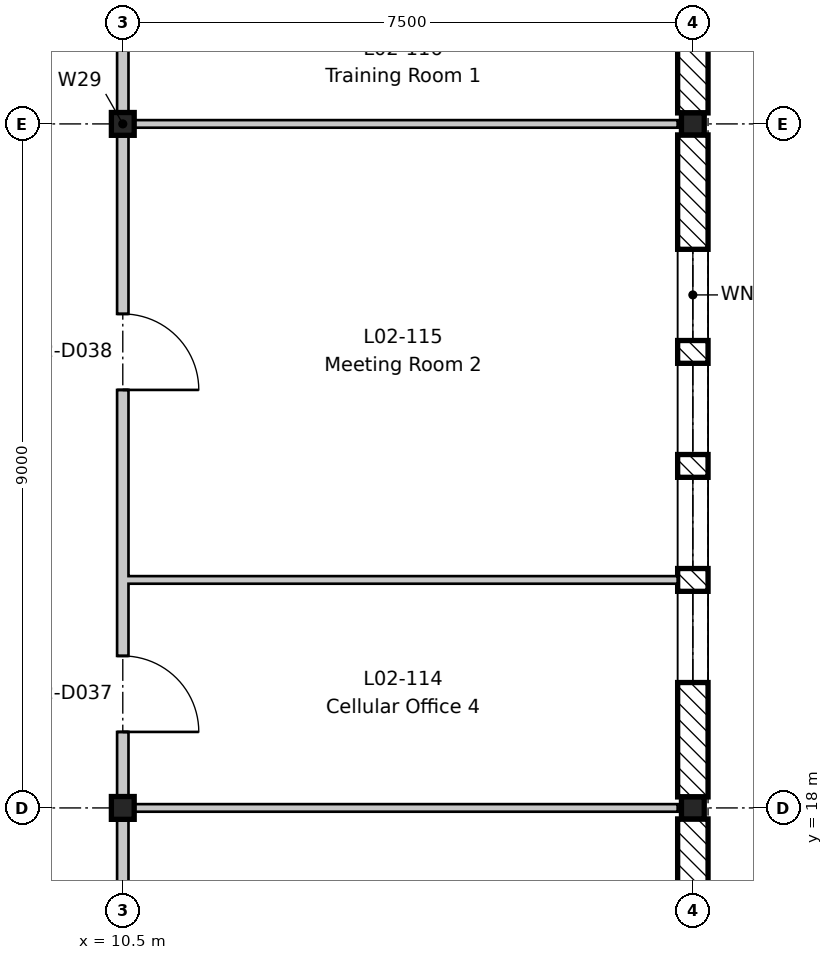
"""IFC4 building model, lengths in metres.
Left out: names, types, materials, properties, quantities, classifications, styles, units other than length and angle.
Written with IfcOpenShell. Run it as: python <this file> out.ifc"""

import sys

from ifc_helpers import new_model, si_unit, direction, frame, frame_2d, origin, origin_2d, place, context, subcontext, project, spatial, rectangle, i_section, extrude, element, fill, save


model = new_model("IFC4")
c1 = context("Model", 3, precision=1e-05, world=origin(), true_north=direction((0.0, 1.0)))
c2 = subcontext(c1, "Body", "Model", "MODEL_VIEW")
j1 = project(units=[si_unit("LENGTHUNIT", "METRE"), si_unit("PLANEANGLEUNIT", "RADIAN")], contexts=[c1])
p1 = place(None, origin())
s1 = spatial("IfcSite", under=j1, at=p1, CompositionType="ELEMENT")
p2 = place(p1, origin())
s2 = spatial("IfcBuilding", under=s1, at=p2, CompositionType="ELEMENT")
p3 = place(p2, frame((0.0, 0.0, 9.9)))
s3 = spatial("IfcBuildingStorey", under=s2, at=p3, CompositionType="ELEMENT", Elevation=9.9)
for number, where, z_axis, x_axis in (
    (1, (10.5, 18.0, -0.2), (0.0, 0.0, 1.0), (1.0, 0.0, 0.0)),
    (2, (10.5, 27.0, -0.2), (0.0, 0.0, 1.0), (1.0, 0.0, 0.0)),
):
    element("IfcColumn", number, at=place(p3, frame(where, z_axis=z_axis, x_axis=x_axis)), inside=s3, PredefinedType="COLUMN", context=c2, shape_type="SweptSolid", body=[
        extrude(i_section(OverallWidth=0.3, OverallDepth=0.3, WebThickness=0.011, FlangeThickness=0.019, FilletRadius=0.027, at=origin_2d()), origin(), (0.0, 0.0, 1.0), 4.5),
    ])
for number, where, z_axis, x_axis in (
    (3, (18.0, 18.0, -0.2), (0.0, 0.0, 1.0), (1.0, 0.0, 0.0)),
    (4, (18.0, 27.0, -0.2), (0.0, 0.0, 1.0), (1.0, 0.0, 0.0)),
):
    element("IfcColumn", number, at=place(p3, frame(where, z_axis=z_axis, x_axis=x_axis)), inside=s3, PredefinedType="COLUMN", context=c2, shape_type="SweptSolid", body=[
        extrude(i_section(OverallWidth=0.3, OverallDepth=0.29, WebThickness=0.009, FlangeThickness=0.014, FilletRadius=0.027, at=origin_2d()), origin(), (0.0, 0.0, 1.0), 4.5),
    ])
p4 = place(p3, frame((18.0, 17.855, 0.0), z_axis=(0.0, 0.0, 1.0), x_axis=(0.0, -1.0, 0.0)))
e5 = element("IfcWall", 5, at=p4, inside=s3, PredefinedType="STANDARD", context=c2, shape_type="SweptSolid", body=[
    extrude(rectangle(XDim=8.71, YDim=0.4, at=frame_2d((4.355, 0.0))), origin(), (0.0, 0.0, 1.0), 3.9),
])
p5 = place(p3, frame((18.0, 26.855, 0.0), z_axis=(0.0, 0.0, 1.0), x_axis=(0.0, -1.0, 0.0)))
e6 = element("IfcWall", 6, at=p5, inside=s3, PredefinedType="STANDARD", context=c2, shape_type="SweptSolid", body=[
    extrude(rectangle(XDim=8.71, YDim=0.4, at=frame_2d((4.355, 0.0))), origin(), (0.0, 0.0, 1.0), 3.9),
])
p6 = place(p5, frame((6.005, 0.0, 0.6)))
e7 = element("IfcOpeningElement", 7, at=p6, cuts=e6, PredefinedType="OPENING", context=c2, shape_type="SweptSolid", body=[
    extrude(rectangle(XDim=1.2, YDim=3.0, at=frame_2d((0.6, 1.5))), frame((0.0, 0.21, 0.0), z_axis=(0.0, -1.0, 0.0), x_axis=(1.0, 0.0, 0.0)), (0.0, 0.0, 1.0), 0.42),
])
p7 = place(p5, frame((4.505, 0.0, 0.6)))
e8 = element("IfcOpeningElement", 8, at=p7, cuts=e6, PredefinedType="OPENING", context=c2, shape_type="SweptSolid", body=[
    extrude(rectangle(XDim=1.2, YDim=3.0, at=frame_2d((0.6, 1.5))), frame((0.0, 0.21, 0.0), z_axis=(0.0, -1.0, 0.0), x_axis=(1.0, 0.0, 0.0)), (0.0, 0.0, 1.0), 0.42),
])
p8 = place(p5, frame((3.005, 0.0, 0.6)))
e9 = element("IfcOpeningElement", 9, at=p8, cuts=e6, PredefinedType="OPENING", context=c2, shape_type="SweptSolid", body=[
    extrude(rectangle(XDim=1.2, YDim=3.0, at=frame_2d((0.6, 1.5))), frame((0.0, 0.21, 0.0), z_axis=(0.0, -1.0, 0.0), x_axis=(1.0, 0.0, 0.0)), (0.0, 0.0, 1.0), 0.42),
])
p9 = place(p5, frame((1.505, 0.0, 0.6)))
e10 = element("IfcOpeningElement", 10, at=p9, cuts=e6, PredefinedType="OPENING", context=c2, shape_type="SweptSolid", body=[
    extrude(rectangle(XDim=1.2, YDim=3.0, at=frame_2d((0.6, 1.5))), frame((0.0, 0.21, 0.0), z_axis=(0.0, -1.0, 0.0), x_axis=(1.0, 0.0, 0.0)), (0.0, 0.0, 1.0), 0.42),
])
p10 = place(p3, frame((18.0, 35.855, 0.0), z_axis=(0.0, 0.0, 1.0), x_axis=(0.0, -1.0, 0.0)))
e11 = element("IfcWall", 11, at=p10, inside=s3, PredefinedType="STANDARD", context=c2, shape_type="SweptSolid", body=[
    extrude(rectangle(XDim=8.71, YDim=0.4, at=frame_2d((4.355, 0.0))), origin(), (0.0, 0.0, 1.0), 3.9),
])
p11 = place(p10, frame((6.005, 0.0, 0.6)))
e12 = element("IfcOpeningElement", 12, at=p11, cuts=e11, PredefinedType="OPENING", context=c2, shape_type="SweptSolid", body=[
    extrude(rectangle(XDim=1.2, YDim=3.0, at=frame_2d((0.6, 1.5))), frame((0.0, 0.21, 0.0), z_axis=(0.0, -1.0, 0.0), x_axis=(1.0, 0.0, 0.0)), (0.0, 0.0, 1.0), 0.42),
])
p12 = place(p10, frame((4.505, 0.0, 0.6)))
e13 = element("IfcOpeningElement", 13, at=p12, cuts=e11, PredefinedType="OPENING", context=c2, shape_type="SweptSolid", body=[
    extrude(rectangle(XDim=1.2, YDim=3.0, at=frame_2d((0.6, 1.5))), frame((0.0, 0.21, 0.0), z_axis=(0.0, -1.0, 0.0), x_axis=(1.0, 0.0, 0.0)), (0.0, 0.0, 1.0), 0.42),
])
p13 = place(p10, frame((3.005, 0.0, 0.6)))
e14 = element("IfcOpeningElement", 14, at=p13, cuts=e11, PredefinedType="OPENING", context=c2, shape_type="SweptSolid", body=[
    extrude(rectangle(XDim=1.2, YDim=3.0, at=frame_2d((0.6, 1.5))), frame((0.0, 0.21, 0.0), z_axis=(0.0, -1.0, 0.0), x_axis=(1.0, 0.0, 0.0)), (0.0, 0.0, 1.0), 0.42),
])
p14 = place(p10, frame((1.505, 0.0, 0.6)))
e15 = element("IfcOpeningElement", 15, at=p14, cuts=e11, PredefinedType="OPENING", context=c2, shape_type="SweptSolid", body=[
    extrude(rectangle(XDim=1.2, YDim=3.0, at=frame_2d((0.6, 1.5))), frame((0.0, 0.21, 0.0), z_axis=(0.0, -1.0, 0.0), x_axis=(1.0, 0.0, 0.0)), (0.0, 0.0, 1.0), 0.42),
])
p15 = place(p3, frame((10.575, 18.0, 0.0), z_axis=(0.0, 0.0, 1.0), x_axis=(1.0, 0.0, 0.0)))
e16 = element("IfcWall", 16, at=p15, inside=s3, PredefinedType="PARTITIONING", context=c2, shape_type="SweptSolid", body=[
    extrude(rectangle(XDim=7.225, YDim=0.1, at=frame_2d((3.613, 0.0))), origin(), (0.0, 0.0, 1.0), 3.95),
])
p16 = place(p3, frame((10.575, 21.0, 0.0), z_axis=(0.0, 0.0, 1.0), x_axis=(1.0, 0.0, 0.0)))
e17 = element("IfcWall", 17, at=p16, inside=s3, PredefinedType="PARTITIONING", context=c2, shape_type="SweptSolid", body=[
    extrude(rectangle(XDim=7.225, YDim=0.1, at=frame_2d((3.613, 0.0))), origin(), (0.0, 0.0, 1.0), 4.3),
])
p17 = place(p3, frame((10.575, 27.0, 0.0), z_axis=(0.0, 0.0, 1.0), x_axis=(1.0, 0.0, 0.0)))
e18 = element("IfcWall", 18, at=p17, inside=s3, PredefinedType="PARTITIONING", context=c2, shape_type="SweptSolid", body=[
    extrude(rectangle(XDim=7.225, YDim=0.1, at=frame_2d((3.613, 0.0))), origin(), (0.0, 0.0, 1.0), 3.95),
])
p18 = place(p3, frame((10.5, -8.8, 0.0), z_axis=(0.0, 0.0, 1.0), x_axis=(0.0, 1.0, 0.0)))
e19 = element("IfcWall", 19, at=p18, inside=s3, PredefinedType="PARTITIONING", context=c2, shape_type="SweptSolid", body=[
    extrude(rectangle(XDim=79.3, YDim=0.15, at=frame_2d((39.65, 0.0))), origin(), (0.0, 0.0, 1.0), 3.78),
])
p19 = place(p18, frame((0.8, 0.0, 0.0)))
e20 = element("IfcOpeningElement", 20, at=p19, cuts=e19, PredefinedType="OPENING", context=c2, shape_type="SweptSolid", body=[
    extrude(rectangle(XDim=1.0, YDim=2.1, at=frame_2d((0.5, 1.05))), frame((0.0, 0.085, 0.0), z_axis=(0.0, -1.0, 0.0), x_axis=(1.0, 0.0, 0.0)), (0.0, 0.0, 1.0), 0.17),
])
p20 = place(p18, frame((5.3, 0.0, 0.0)))
e21 = element("IfcOpeningElement", 21, at=p20, cuts=e19, PredefinedType="OPENING", context=c2, shape_type="SweptSolid", body=[
    extrude(rectangle(XDim=1.0, YDim=2.1, at=frame_2d((0.5, 1.05))), frame((0.0, 0.085, 0.0), z_axis=(0.0, -1.0, 0.0), x_axis=(1.0, 0.0, 0.0)), (0.0, 0.0, 1.0), 0.17),
])
p21 = place(p18, frame((9.8, 0.0, 0.0)))
e22 = element("IfcOpeningElement", 22, at=p21, cuts=e19, PredefinedType="OPENING", context=c2, shape_type="SweptSolid", body=[
    extrude(rectangle(XDim=1.0, YDim=2.1, at=frame_2d((0.5, 1.05))), frame((0.0, 0.085, 0.0), z_axis=(0.0, -1.0, 0.0), x_axis=(1.0, 0.0, 0.0)), (0.0, 0.0, 1.0), 0.17),
])
p22 = place(p18, frame((12.8, 0.0, 0.0)))
e23 = element("IfcOpeningElement", 23, at=p22, cuts=e19, PredefinedType="OPENING", context=c2, shape_type="SweptSolid", body=[
    extrude(rectangle(XDim=1.0, YDim=2.1, at=frame_2d((0.5, 1.05))), frame((0.0, 0.085, 0.0), z_axis=(0.0, -1.0, 0.0), x_axis=(1.0, 0.0, 0.0)), (0.0, 0.0, 1.0), 0.17),
])
p23 = place(p18, frame((15.8, 0.0, 0.0)))
e24 = element("IfcOpeningElement", 24, at=p23, cuts=e19, PredefinedType="OPENING", context=c2, shape_type="SweptSolid", body=[
    extrude(rectangle(XDim=1.0, YDim=2.1, at=frame_2d((0.5, 1.05))), frame((0.0, 0.085, 0.0), z_axis=(0.0, -1.0, 0.0), x_axis=(1.0, 0.0, 0.0)), (0.0, 0.0, 1.0), 0.17),
])
p24 = place(p18, frame((20.3, 0.0, 0.0)))
e25 = element("IfcOpeningElement", 25, at=p24, cuts=e19, PredefinedType="OPENING", context=c2, shape_type="SweptSolid", body=[
    extrude(rectangle(XDim=1.0, YDim=2.1, at=frame_2d((0.5, 1.05))), frame((0.0, 0.085, 0.0), z_axis=(0.0, -1.0, 0.0), x_axis=(1.0, 0.0, 0.0)), (0.0, 0.0, 1.0), 0.17),
])
p25 = place(p18, frame((24.8, 0.0, 0.0)))
e26 = element("IfcOpeningElement", 26, at=p25, cuts=e19, PredefinedType="OPENING", context=c2, shape_type="SweptSolid", body=[
    extrude(rectangle(XDim=1.0, YDim=2.1, at=frame_2d((0.5, 1.05))), frame((0.0, 0.085, 0.0), z_axis=(0.0, -1.0, 0.0), x_axis=(1.0, 0.0, 0.0)), (0.0, 0.0, 1.0), 0.17),
])
p26 = place(p18, frame((27.8, 0.0, 0.0)))
e27 = element("IfcOpeningElement", 27, at=p26, cuts=e19, PredefinedType="OPENING", context=c2, shape_type="SweptSolid", body=[
    extrude(rectangle(XDim=1.0, YDim=2.1, at=frame_2d((0.5, 1.05))), frame((0.0, 0.085, 0.0), z_axis=(0.0, -1.0, 0.0), x_axis=(1.0, 0.0, 0.0)), (0.0, 0.0, 1.0), 0.17),
])
p27 = place(p18, frame((32.3, 0.0, 0.0)))
e28 = element("IfcOpeningElement", 28, at=p27, cuts=e19, PredefinedType="OPENING", context=c2, shape_type="SweptSolid", body=[
    extrude(rectangle(XDim=1.0, YDim=2.1, at=frame_2d((0.5, 1.05))), frame((0.0, 0.085, 0.0), z_axis=(0.0, -1.0, 0.0), x_axis=(1.0, 0.0, 0.0)), (0.0, 0.0, 1.0), 0.17),
])
p28 = place(p18, frame((38.3, 0.0, 0.0)))
e29 = element("IfcOpeningElement", 29, at=p28, cuts=e19, PredefinedType="OPENING", context=c2, shape_type="SweptSolid", body=[
    extrude(rectangle(XDim=1.0, YDim=2.1, at=frame_2d((0.5, 1.05))), frame((0.0, 0.085, 0.0), z_axis=(0.0, -1.0, 0.0), x_axis=(1.0, 0.0, 0.0)), (0.0, 0.0, 1.0), 0.17),
])
p29 = place(p18, frame((42.8, 0.0, 0.0)))
e30 = element("IfcOpeningElement", 30, at=p29, cuts=e19, PredefinedType="OPENING", context=c2, shape_type="SweptSolid", body=[
    extrude(rectangle(XDim=1.0, YDim=2.1, at=frame_2d((0.5, 1.05))), frame((0.0, 0.085, 0.0), z_axis=(0.0, -1.0, 0.0), x_axis=(1.0, 0.0, 0.0)), (0.0, 0.0, 1.0), 0.17),
])
p30 = place(p18, frame((45.8, 0.0, 0.0)))
e31 = element("IfcOpeningElement", 31, at=p30, cuts=e19, PredefinedType="OPENING", context=c2, shape_type="SweptSolid", body=[
    extrude(rectangle(XDim=1.0, YDim=2.1, at=frame_2d((0.5, 1.05))), frame((0.0, 0.085, 0.0), z_axis=(0.0, -1.0, 0.0), x_axis=(1.0, 0.0, 0.0)), (0.0, 0.0, 1.0), 0.17),
])
p31 = place(p18, frame((50.3, 0.0, 0.0)))
e32 = element("IfcOpeningElement", 32, at=p31, cuts=e19, PredefinedType="OPENING", context=c2, shape_type="SweptSolid", body=[
    extrude(rectangle(XDim=1.0, YDim=2.1, at=frame_2d((0.5, 1.05))), frame((0.0, 0.085, 0.0), z_axis=(0.0, -1.0, 0.0), x_axis=(1.0, 0.0, 0.0)), (0.0, 0.0, 1.0), 0.17),
])
p32 = place(p18, frame((54.8, 0.0, 0.0)))
e33 = element("IfcOpeningElement", 33, at=p32, cuts=e19, PredefinedType="OPENING", context=c2, shape_type="SweptSolid", body=[
    extrude(rectangle(XDim=1.0, YDim=2.1, at=frame_2d((0.5, 1.05))), frame((0.0, 0.085, 0.0), z_axis=(0.0, -1.0, 0.0), x_axis=(1.0, 0.0, 0.0)), (0.0, 0.0, 1.0), 0.17),
])
p33 = place(p18, frame((57.8, 0.0, 0.0)))
e34 = element("IfcOpeningElement", 34, at=p33, cuts=e19, PredefinedType="OPENING", context=c2, shape_type="SweptSolid", body=[
    extrude(rectangle(XDim=1.0, YDim=2.1, at=frame_2d((0.5, 1.05))), frame((0.0, 0.085, 0.0), z_axis=(0.0, -1.0, 0.0), x_axis=(1.0, 0.0, 0.0)), (0.0, 0.0, 1.0), 0.17),
])
p34 = place(p18, frame((63.6, 0.0, 0.0)))
e35 = element("IfcOpeningElement", 35, at=p34, cuts=e19, PredefinedType="OPENING", context=c2, shape_type="SweptSolid", body=[
    extrude(rectangle(XDim=1.4, YDim=2.1, at=frame_2d((0.7, 1.05))), frame((0.0, 0.085, 0.0), z_axis=(0.0, -1.0, 0.0), x_axis=(1.0, 0.0, 0.0)), (0.0, 0.0, 1.0), 0.17),
])
p35 = place(p18, frame((69.8, 0.0, 0.0)))
e36 = element("IfcOpeningElement", 36, at=p35, cuts=e19, PredefinedType="OPENING", context=c2, shape_type="SweptSolid", body=[
    extrude(rectangle(XDim=1.0, YDim=2.1, at=frame_2d((0.5, 1.05))), frame((0.0, 0.085, 0.0), z_axis=(0.0, -1.0, 0.0), x_axis=(1.0, 0.0, 0.0)), (0.0, 0.0, 1.0), 0.17),
])
p36 = place(p18, frame((72.8, 0.0, 0.0)))
e37 = element("IfcOpeningElement", 37, at=p36, cuts=e19, PredefinedType="OPENING", context=c2, shape_type="SweptSolid", body=[
    extrude(rectangle(XDim=1.0, YDim=2.1, at=frame_2d((0.5, 1.05))), frame((0.0, 0.085, 0.0), z_axis=(0.0, -1.0, 0.0), x_axis=(1.0, 0.0, 0.0)), (0.0, 0.0, 1.0), 0.17),
])
p37 = place(p6, origin())
e38 = element("IfcWindow", 38, at=p37, inside=s3, PartitioningType="SINGLE_PANEL", PredefinedType="WINDOW", context=c2, shape_type="SweptSolid", body=[
    extrude(rectangle(XDim=1.2, YDim=3.0, at=frame_2d((0.6, 1.5))), frame((0.0, 0.03, 0.0), z_axis=(0.0, -1.0, 0.0), x_axis=(1.0, 0.0, 0.0)), (0.0, 0.0, 1.0), 0.06),
])
fill(e7, e38)
p38 = place(p7, origin())
e39 = element("IfcWindow", 39, at=p38, inside=s3, PartitioningType="SINGLE_PANEL", PredefinedType="WINDOW", context=c2, shape_type="SweptSolid", body=[
    extrude(rectangle(XDim=1.2, YDim=3.0, at=frame_2d((0.6, 1.5))), frame((0.0, 0.03, 0.0), z_axis=(0.0, -1.0, 0.0), x_axis=(1.0, 0.0, 0.0)), (0.0, 0.0, 1.0), 0.06),
])
fill(e8, e39)
p39 = place(p8, origin())
e40 = element("IfcWindow", 40, at=p39, inside=s3, PartitioningType="SINGLE_PANEL", PredefinedType="WINDOW", context=c2, shape_type="SweptSolid", body=[
    extrude(rectangle(XDim=1.2, YDim=3.0, at=frame_2d((0.6, 1.5))), frame((0.0, 0.03, 0.0), z_axis=(0.0, -1.0, 0.0), x_axis=(1.0, 0.0, 0.0)), (0.0, 0.0, 1.0), 0.06),
])
fill(e9, e40)
p40 = place(p9, origin())
e41 = element("IfcWindow", 41, at=p40, inside=s3, PartitioningType="SINGLE_PANEL", PredefinedType="WINDOW", context=c2, shape_type="SweptSolid", body=[
    extrude(rectangle(XDim=1.2, YDim=3.0, at=frame_2d((0.6, 1.5))), frame((0.0, 0.03, 0.0), z_axis=(0.0, -1.0, 0.0), x_axis=(1.0, 0.0, 0.0)), (0.0, 0.0, 1.0), 0.06),
])
fill(e10, e41)
p41 = place(p26, frame((1.0, 0.0, 0.0), z_axis=(0.0, 0.0, 1.0), x_axis=(-1.0, 0.0, 0.0)))
e42 = element("IfcDoor", 42, at=p41, inside=s3, OperationType="SINGLE_SWING_RIGHT", PredefinedType="DOOR", context=c2, shape_type="SweptSolid", body=[
    extrude(rectangle(XDim=1.0, YDim=2.1, at=frame_2d((0.5, 1.05))), frame((0.0, 0.025, 0.0), z_axis=(0.0, -1.0, 0.0), x_axis=(1.0, 0.0, 0.0)), (0.0, 0.0, 1.0), 0.05),
])
fill(e27, e42)
p42 = place(p27, frame((1.0, 0.0, 0.0), z_axis=(0.0, 0.0, 1.0), x_axis=(-1.0, 0.0, 0.0)))
e43 = element("IfcDoor", 43, at=p42, inside=s3, OperationType="SINGLE_SWING_RIGHT", PredefinedType="DOOR", context=c2, shape_type="SweptSolid", body=[
    extrude(rectangle(XDim=1.0, YDim=2.1, at=frame_2d((0.5, 1.05))), frame((0.0, 0.025, 0.0), z_axis=(0.0, -1.0, 0.0), x_axis=(1.0, 0.0, 0.0)), (0.0, 0.0, 1.0), 0.05),
])
fill(e28, e43)
save(model, sys.argv[1])
